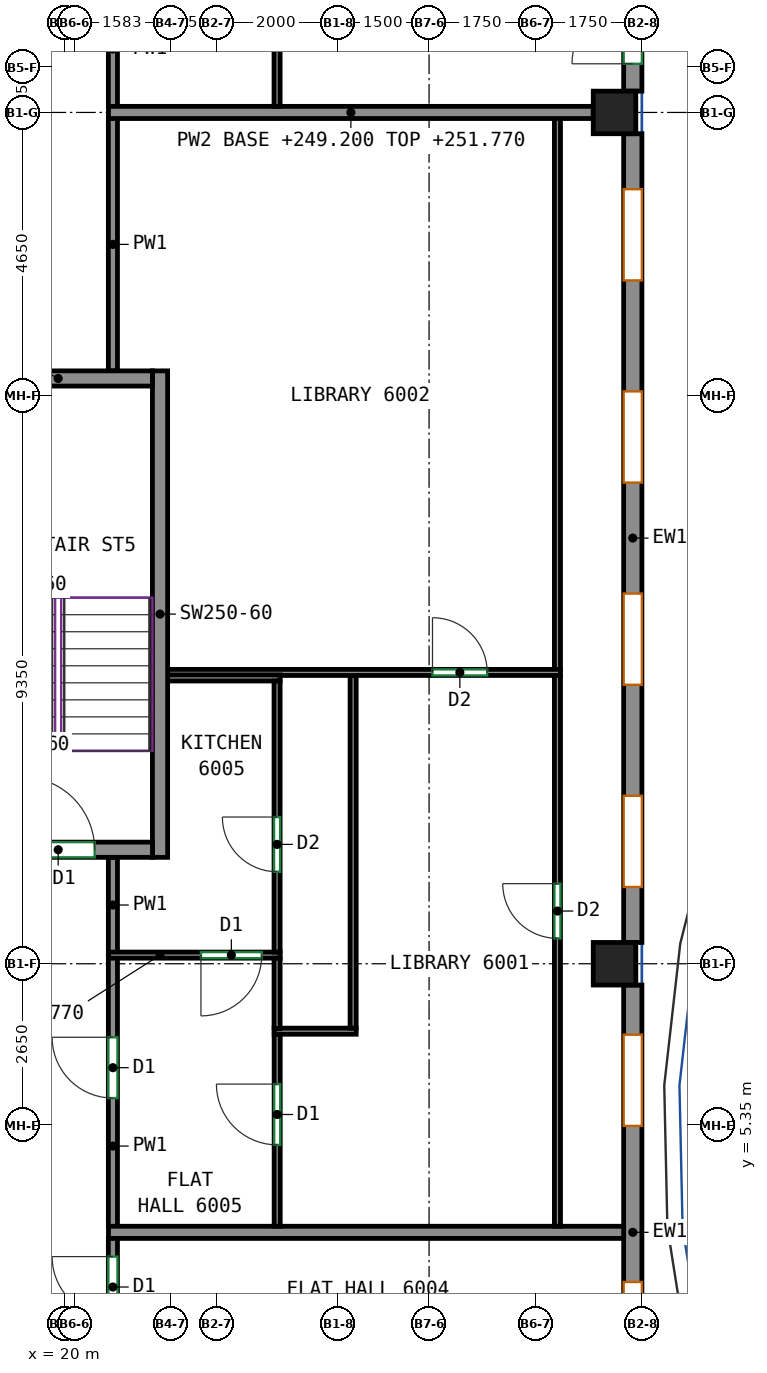
"""IFC4 building model, lengths in metres.
Left out: names, types, materials, properties, quantities, classifications, styles, units other than length and angle.
Written with IfcOpenShell. Run it as: python <this file> out.ifc"""

import sys

from ifc_helpers import new_model, si_unit, direction, frame, frame_2d, origin, origin_2d, place, context, subcontext, project, spatial, rectangle, extrude, source, transform, mapped, element, fill, save


model = new_model("IFC4")
c1 = context("Model", 3, precision=1e-05, world=origin(), true_north=direction((0.0, 1.0)))
c2 = subcontext(c1, "Body", "Model", "MODEL_VIEW")
j1 = project(units=[si_unit("LENGTHUNIT", "METRE"), si_unit("PLANEANGLEUNIT", "RADIAN")], contexts=[c1])
p1 = place(None, origin())
s1 = spatial("IfcSite", under=j1, at=p1, CompositionType="ELEMENT")
p2 = place(p1, origin())
s2 = spatial("IfcBuilding", under=s1, at=p2, CompositionType="ELEMENT")
p3 = place(p2, frame((0.0, 0.0, 249.2)))
s3 = spatial("IfcBuildingStorey", under=s2, at=p3, CompositionType="ELEMENT", Elevation=249.2)
m1 = source(origin(), c2, "Body", "SweptSolid", [
    extrude(rectangle(XDim=0.7, YDim=0.7, at=origin_2d()), origin(), (0.0, 0.0, 1.0), 3.12),
])
for number, where, z_axis, x_axis in (
    (1, (29.05, 8.0, 0.0), (0.0, 0.0, 1.0), (1.0, 0.0, 0.0)),
    (2, (29.05, 22.0, 0.0), (0.0, 0.0, 1.0), (1.0, 0.0, 0.0)),
):
    element("IfcColumn", number, at=place(p3, frame(where, z_axis=z_axis, x_axis=x_axis)), inside=s3, PredefinedType="COLUMN", context=c2, shape_type="MappedRepresentation", body=[
        mapped(m1, transform((0.0, 0.0, 0.0))),
    ])
m2 = source(origin(), c2, "Body", "SweptSolid", [
    extrude(rectangle(XDim=8.0, YDim=0.25, at=frame_2d((4.0, 0.0))), origin(), (0.0, 0.0, 1.0), 3.12),
])
p4 = place(p3, frame((21.575, 9.75, 0.0), z_axis=(0.0, 0.0, 1.0), x_axis=(0.0, 1.0, 0.0)))
e3 = element("IfcWall", 3, at=p4, inside=s3, PredefinedType="SHEAR", context=c2, shape_type="MappedRepresentation", body=[
    mapped(m2, transform((0.0, 0.0, 0.0))),
])
m3 = source(origin(), c2, "Body", "SweptSolid", [
    extrude(rectangle(XDim=3.1, YDim=0.25, at=frame_2d((1.55, 0.0))), origin(), (0.0, 0.0, 1.0), 3.12),
])
p5 = place(p3, frame((18.35, 9.875, 0.0), z_axis=(0.0, 0.0, 1.0), x_axis=(1.0, 0.0, 0.0)))
e4 = element("IfcWall", 4, at=p5, inside=s3, PredefinedType="SHEAR", context=c2, shape_type="MappedRepresentation", body=[
    mapped(m3, transform((0.0, 0.0, 0.0))),
])
p6 = place(p5, frame((0.95, 0.0, 0.0)))
e5 = element("IfcOpeningElement", 5, at=p6, cuts=e4, PredefinedType="OPENING", context=c2, shape_type="SweptSolid", body=[
    extrude(rectangle(XDim=1.2, YDim=2.1, at=frame_2d((0.6, 1.05))), frame((0.0, 0.135, 0.0), z_axis=(0.0, -1.0, 0.0), x_axis=(1.0, 0.0, 0.0)), (0.0, 0.0, 1.0), 0.27),
])
p7 = place(p3, frame((18.35, 17.625, 0.0), z_axis=(0.0, 0.0, 1.0), x_axis=(1.0, 0.0, 0.0)))
e6 = element("IfcWall", 6, at=p7, inside=s3, PredefinedType="SHEAR", context=c2, shape_type="MappedRepresentation", body=[
    mapped(m3, transform((0.0, 0.0, 0.0))),
])
m4 = source(origin(), c2, "Body", "SweptSolid", [
    extrude(rectangle(XDim=8.133, YDim=0.3, at=frame_2d((4.067, 0.0))), origin(), (0.0, 0.0, 1.0), 3.12),
])
p8 = place(p3, frame((29.35, -0.483, 0.0), z_axis=(0.0, 0.0, 1.0), x_axis=(0.0, 1.0, 0.0)))
e7 = element("IfcWall", 7, at=p8, inside=s3, PredefinedType="SOLIDWALL", context=c2, shape_type="MappedRepresentation", body=[
    mapped(m4, transform((0.0, 0.0, 0.0))),
])
p9 = place(p8, frame((1.75, 0.0, 0.8)))
e8 = element("IfcOpeningElement", 8, at=p9, cuts=e7, PredefinedType="OPENING", context=c2, shape_type="SweptSolid", body=[
    extrude(rectangle(XDim=1.5, YDim=2.05, at=frame_2d((0.75, 1.025))), frame((0.0, 0.16, 0.0), z_axis=(0.0, -1.0, 0.0), x_axis=(1.0, 0.0, 0.0)), (0.0, 0.0, 1.0), 0.32),
])
p10 = place(p8, frame((5.817, 0.0, 0.8)))
e9 = element("IfcOpeningElement", 9, at=p10, cuts=e7, PredefinedType="OPENING", context=c2, shape_type="SweptSolid", body=[
    extrude(rectangle(XDim=1.5, YDim=2.05, at=frame_2d((0.75, 1.025))), frame((0.0, 0.16, 0.0), z_axis=(0.0, -1.0, 0.0), x_axis=(1.0, 0.0, 0.0)), (0.0, 0.0, 1.0), 0.32),
])
m5 = source(origin(), c2, "Body", "SweptSolid", [
    extrude(rectangle(XDim=13.3, YDim=0.3, at=frame_2d((6.65, 0.0))), origin(), (0.0, 0.0, 1.0), 3.12),
])
p11 = place(p3, frame((29.35, 8.35, 0.0), z_axis=(0.0, 0.0, 1.0), x_axis=(0.0, 1.0, 0.0)))
e10 = element("IfcWall", 10, at=p11, inside=s3, PredefinedType="SOLIDWALL", context=c2, shape_type="MappedRepresentation", body=[
    mapped(m5, transform((0.0, 0.0, 0.0))),
])
p12 = place(p11, frame((0.913, 0.0, 0.8)))
e11 = element("IfcOpeningElement", 11, at=p12, cuts=e10, PredefinedType="OPENING", context=c2, shape_type="SweptSolid", body=[
    extrude(rectangle(XDim=1.5, YDim=2.05, at=frame_2d((0.75, 1.025))), frame((0.0, 0.16, 0.0), z_axis=(0.0, -1.0, 0.0), x_axis=(1.0, 0.0, 0.0)), (0.0, 0.0, 1.0), 0.32),
])
p13 = place(p11, frame((4.238, 0.0, 0.8)))
e12 = element("IfcOpeningElement", 12, at=p13, cuts=e10, PredefinedType="OPENING", context=c2, shape_type="SweptSolid", body=[
    extrude(rectangle(XDim=1.5, YDim=2.05, at=frame_2d((0.75, 1.025))), frame((0.0, 0.16, 0.0), z_axis=(0.0, -1.0, 0.0), x_axis=(1.0, 0.0, 0.0)), (0.0, 0.0, 1.0), 0.32),
])
p14 = place(p11, frame((7.562, 0.0, 0.8)))
e13 = element("IfcOpeningElement", 13, at=p14, cuts=e10, PredefinedType="OPENING", context=c2, shape_type="SweptSolid", body=[
    extrude(rectangle(XDim=1.5, YDim=2.05, at=frame_2d((0.75, 1.025))), frame((0.0, 0.16, 0.0), z_axis=(0.0, -1.0, 0.0), x_axis=(1.0, 0.0, 0.0)), (0.0, 0.0, 1.0), 0.32),
])
p15 = place(p11, frame((10.887, 0.0, 0.8)))
e14 = element("IfcOpeningElement", 14, at=p15, cuts=e10, PredefinedType="OPENING", context=c2, shape_type="SweptSolid", body=[
    extrude(rectangle(XDim=1.5, YDim=2.05, at=frame_2d((0.75, 1.025))), frame((0.0, 0.16, 0.0), z_axis=(0.0, -1.0, 0.0), x_axis=(1.0, 0.0, 0.0)), (0.0, 0.0, 1.0), 0.32),
])
m6 = source(origin(), c2, "Body", "SweptSolid", [
    extrude(rectangle(XDim=4.3, YDim=0.3, at=frame_2d((2.15, 0.0))), origin(), (0.0, 0.0, 1.0), 3.12),
])
p16 = place(p3, frame((29.35, 22.35, 0.0), z_axis=(0.0, 0.0, 1.0), x_axis=(0.0, 1.0, 0.0)))
e15 = element("IfcWall", 15, at=p16, inside=s3, PredefinedType="SOLIDWALL", context=c2, shape_type="MappedRepresentation", body=[
    mapped(m6, transform((0.0, 0.0, 0.0))),
])
p17 = place(p16, frame((1.75, 0.0, 0.8)))
e16 = element("IfcOpeningElement", 16, at=p17, cuts=e15, PredefinedType="OPENING", context=c2, shape_type="SweptSolid", body=[
    extrude(rectangle(XDim=1.5, YDim=2.05, at=frame_2d((0.75, 1.025))), frame((0.0, 0.16, 0.0), z_axis=(0.0, -1.0, 0.0), x_axis=(1.0, 0.0, 0.0)), (0.0, 0.0, 1.0), 0.32),
])
p18 = place(p16, frame((0.45, 0.0, 0.0)))
e17 = element("IfcOpeningElement", 17, at=p18, cuts=e15, PredefinedType="OPENING", context=c2, shape_type="SweptSolid", body=[
    extrude(rectangle(XDim=1.0, YDim=2.1, at=frame_2d((0.5, 1.05))), frame((0.0, 0.16, 0.0), z_axis=(0.0, -1.0, 0.0), x_axis=(1.0, 0.0, 0.0)), (0.0, 0.0, 1.0), 0.32),
])
p19 = place(p3, frame((20.8, 1.007, 0.0), z_axis=(0.0, 0.0, 1.0), x_axis=(0.0, 1.0, 0.0)))
e18 = element("IfcWall", 18, at=p19, inside=s3, PredefinedType="PARTITIONING", context=c2, shape_type="SweptSolid", body=[
    extrude(rectangle(XDim=2.486, YDim=0.15, at=frame_2d((1.243, 0.0))), origin(), (0.0, 0.0, 1.0), 3.12),
])
p20 = place(p19, frame((1.177, 0.0, 0.0)))
e19 = element("IfcOpeningElement", 19, at=p20, cuts=e18, PredefinedType="OPENING", context=c2, shape_type="SweptSolid", body=[
    extrude(rectangle(XDim=1.0, YDim=2.1, at=frame_2d((0.5, 1.05))), frame((0.0, 0.085, 0.0), z_axis=(0.0, -1.0, 0.0), x_axis=(1.0, 0.0, 0.0)), (0.0, 0.0, 1.0), 0.17),
])
p21 = place(p3, frame((20.8, 17.75, 0.0), z_axis=(0.0, 0.0, 1.0), x_axis=(0.0, 1.0, 0.0)))
e20 = element("IfcWall", 20, at=p21, inside=s3, PredefinedType="PARTITIONING", context=c2, shape_type="SweptSolid", body=[
    extrude(rectangle(XDim=4.16, YDim=0.15, at=frame_2d((2.08, 0.0))), origin(), (0.0, 0.0, 1.0), 3.12),
])
p22 = place(p3, frame((20.8, 3.673, 0.0), z_axis=(0.0, 0.0, 1.0), x_axis=(0.0, 1.0, 0.0)))
e21 = element("IfcWall", 21, at=p22, inside=s3, PredefinedType="PARTITIONING", context=c2, shape_type="SweptSolid", body=[
    extrude(rectangle(XDim=4.429, YDim=0.15, at=frame_2d((2.214, 0.0))), origin(), (0.0, 0.0, 1.0), 3.12),
])
p23 = place(p22, frame((2.118, 0.0, 0.0)))
e22 = element("IfcOpeningElement", 22, at=p23, cuts=e21, PredefinedType="OPENING", context=c2, shape_type="SweptSolid", body=[
    extrude(rectangle(XDim=1.0, YDim=2.1, at=frame_2d((0.5, 1.05))), frame((0.0, 0.085, 0.0), z_axis=(0.0, -1.0, 0.0), x_axis=(1.0, 0.0, 0.0)), (0.0, 0.0, 1.0), 0.17),
])
p24 = place(p3, frame((20.8, 8.182, 0.0), z_axis=(0.0, 0.0, 1.0), x_axis=(0.0, 1.0, 0.0)))
e23 = element("IfcWall", 23, at=p24, inside=s3, PredefinedType="PARTITIONING", context=c2, shape_type="SweptSolid", body=[
    extrude(rectangle(XDim=1.568, YDim=0.15, at=frame_2d((0.784, 0.0))), origin(), (0.0, 0.0, 1.0), 3.12),
])
p25 = place(p3, frame((20.8, 22.09, 0.0), z_axis=(0.0, 0.0, 1.0), x_axis=(0.0, 1.0, 0.0)))
e24 = element("IfcWall", 24, at=p25, inside=s3, PredefinedType="PARTITIONING", context=c2, shape_type="SweptSolid", body=[
    extrude(rectangle(XDim=1.908, YDim=0.15, at=frame_2d((0.954, 0.0))), origin(), (0.0, 0.0, 1.0), 3.12),
])
p26 = place(p3, frame((20.727, 3.583, 0.0), z_axis=(0.0, 0.0, 1.0), x_axis=(1.0, 0.0, 0.0)))
e25 = element("IfcWall", 25, at=p26, inside=s3, PredefinedType="PARTITIONING", context=c2, shape_type="SweptSolid", body=[
    extrude(rectangle(XDim=8.523, YDim=0.2, at=frame_2d((4.261, 0.0))), origin(), (0.0, 0.0, 1.0), 3.12),
])
p27 = place(p3, frame((23.502, 3.683, 0.0), z_axis=(0.0, 0.0, 1.0), x_axis=(0.0, 1.0, 0.0)))
e26 = element("IfcWall", 26, at=p27, inside=s3, PredefinedType="PARTITIONING", context=c2, shape_type="SweptSolid", body=[
    extrude(rectangle(XDim=3.158, YDim=0.1, at=frame_2d((1.579, 0.0))), origin(), (0.0, 0.0, 1.0), 3.12),
])
p28 = place(p27, frame((1.338, 0.0, 0.0)))
e27 = element("IfcOpeningElement", 27, at=p28, cuts=e26, PredefinedType="OPENING", context=c2, shape_type="SweptSolid", body=[
    extrude(rectangle(XDim=1.0, YDim=2.1, at=frame_2d((0.5, 1.05))), frame((0.0, 0.06, 0.0), z_axis=(0.0, -1.0, 0.0), x_axis=(1.0, 0.0, 0.0)), (0.0, 0.0, 1.0), 0.12),
])
p29 = place(p3, frame((28.111, 3.683, 0.0), z_axis=(0.0, 0.0, 1.0), x_axis=(0.0, 1.0, 0.0)))
e28 = element("IfcWall", 28, at=p29, inside=s3, PredefinedType="PARTITIONING", context=c2, shape_type="SweptSolid", body=[
    extrude(rectangle(XDim=9.058, YDim=0.1, at=frame_2d((4.529, 0.0))), origin(), (0.0, 0.0, 1.0), 3.12),
])
p30 = place(p29, frame((4.734, 0.0, 0.0)))
e29 = element("IfcOpeningElement", 29, at=p30, cuts=e28, PredefinedType="OPENING", context=c2, shape_type="SweptSolid", body=[
    extrude(rectangle(XDim=0.9, YDim=2.1, at=frame_2d((0.45, 1.05))), frame((0.0, 0.06, 0.0), z_axis=(0.0, -1.0, 0.0), x_axis=(1.0, 0.0, 0.0)), (0.0, 0.0, 1.0), 0.12),
])
p31 = place(p3, frame((24.801, 6.891, 0.0), z_axis=(0.0, 0.0, 1.0), x_axis=(-1.0, 0.0, 0.0)))
e30 = element("IfcWall", 30, at=p31, inside=s3, PredefinedType="PARTITIONING", context=c2, shape_type="SweptSolid", body=[
    extrude(rectangle(XDim=1.349, YDim=0.1, at=frame_2d((0.675, 0.0))), origin(), (0.0, 0.0, 1.0), 3.12),
])
p32 = place(p3, frame((24.751, 12.741, 0.0), z_axis=(0.0, 0.0, 1.0), x_axis=(0.0, -1.0, 0.0)))
e31 = element("IfcWall", 31, at=p32, inside=s3, PredefinedType="PARTITIONING", context=c2, shape_type="SweptSolid", body=[
    extrude(rectangle(XDim=5.8, YDim=0.1, at=frame_2d((2.9, 0.0))), origin(), (0.0, 0.0, 1.0), 3.12),
])
p33 = place(p3, frame((28.111, 12.841, 0.0), z_axis=(0.0, 0.0, 1.0), x_axis=(0.0, 1.0, 0.0)))
e32 = element("IfcWall", 32, at=p33, inside=s3, PredefinedType="PARTITIONING", context=c2, shape_type="SweptSolid", body=[
    extrude(rectangle(XDim=9.059, YDim=0.1, at=frame_2d((4.529, 0.0))), origin(), (0.0, 0.0, 1.0), 3.12),
])
p34 = place(p3, frame((20.727, 22.0, 0.0), z_axis=(0.0, 0.0, 1.0), x_axis=(1.0, 0.0, 0.0)))
e33 = element("IfcWall", 33, at=p34, inside=s3, PredefinedType="PARTITIONING", context=c2, shape_type="SweptSolid", body=[
    extrude(rectangle(XDim=7.973, YDim=0.2, at=frame_2d((3.986, 0.0))), origin(), (0.0, 0.0, 1.0), 2.57),
])
p35 = place(p3, frame((21.7, 12.791, 0.0), z_axis=(0.0, 0.0, 1.0), x_axis=(1.0, 0.0, 0.0)))
e34 = element("IfcWall", 34, at=p35, inside=s3, PredefinedType="PARTITIONING", context=c2, shape_type="SweptSolid", body=[
    extrude(rectangle(XDim=6.461, YDim=0.1, at=frame_2d((3.23, 0.0))), origin(), (0.0, 0.0, 1.0), 3.12),
])
p36 = place(p35, frame((4.356, 0.0, 0.0)))
e35 = element("IfcOpeningElement", 35, at=p36, cuts=e34, PredefinedType="OPENING", context=c2, shape_type="SweptSolid", body=[
    extrude(rectangle(XDim=0.9, YDim=2.1, at=frame_2d((0.45, 1.05))), frame((0.0, 0.06, 0.0), z_axis=(0.0, -1.0, 0.0), x_axis=(1.0, 0.0, 0.0)), (0.0, 0.0, 1.0), 0.12),
])
p37 = place(p3, frame((23.55, 8.142, 0.0), z_axis=(0.0, 0.0, 1.0), x_axis=(-1.0, 0.0, 0.0)))
e36 = element("IfcWall", 36, at=p37, inside=s3, PredefinedType="PARTITIONING", context=c2, shape_type="SweptSolid", body=[
    extrude(rectangle(XDim=2.823, YDim=0.1, at=frame_2d((1.412, 0.0))), origin(), (0.0, 0.0, 1.0), 2.57),
])
p38 = place(p37, frame((0.302, 0.0, 0.0)))
e37 = element("IfcOpeningElement", 37, at=p38, cuts=e36, PredefinedType="OPENING", context=c2, shape_type="SweptSolid", body=[
    extrude(rectangle(XDim=1.0, YDim=2.1, at=frame_2d((0.5, 1.05))), frame((0.0, 0.06, 0.0), z_axis=(0.0, -1.0, 0.0), x_axis=(1.0, 0.0, 0.0)), (0.0, 0.0, 1.0), 0.12),
])
p39 = place(p3, frame((23.5, 6.932, 0.0), z_axis=(0.0, 0.0, 1.0), x_axis=(0.0, 1.0, 0.0)))
e38 = element("IfcWall", 38, at=p39, inside=s3, PredefinedType="PARTITIONING", context=c2, shape_type="SweptSolid", body=[
    extrude(rectangle(XDim=1.16, YDim=0.1, at=frame_2d((0.58, 0.0))), origin(), (0.0, 0.0, 1.0), 3.12),
])
p40 = place(p3, frame((23.55, 12.7, 0.0), z_axis=(0.0, 0.0, 1.0), x_axis=(-1.0, 0.0, 0.0)))
e39 = element("IfcWall", 39, at=p40, inside=s3, PredefinedType="PARTITIONING", context=c2, shape_type="SweptSolid", body=[
    extrude(rectangle(XDim=1.85, YDim=0.1, at=frame_2d((0.925, 0.0))), origin(), (0.0, 0.0, 1.0), 3.12),
])
p41 = place(p3, frame((23.5, 8.192, 0.0), z_axis=(0.0, 0.0, 1.0), x_axis=(0.0, 1.0, 0.0)))
e40 = element("IfcWall", 40, at=p41, inside=s3, PredefinedType="PARTITIONING", context=c2, shape_type="SweptSolid", body=[
    extrude(rectangle(XDim=4.458, YDim=0.1, at=frame_2d((2.229, 0.0))), origin(), (0.0, 0.0, 1.0), 3.12),
])
p42 = place(p41, frame((1.321, 0.0, 0.0)))
e41 = element("IfcOpeningElement", 41, at=p42, cuts=e40, PredefinedType="OPENING", context=c2, shape_type="SweptSolid", body=[
    extrude(rectangle(XDim=0.9, YDim=2.1, at=frame_2d((0.45, 1.05))), frame((0.0, 0.06, 0.0), z_axis=(0.0, -1.0, 0.0), x_axis=(1.0, 0.0, 0.0)), (0.0, 0.0, 1.0), 0.12),
])
p43 = place(p3, frame((23.5, 22.1, 0.0), z_axis=(0.0, 0.0, 1.0), x_axis=(0.0, 1.0, 0.0)))
e42 = element("IfcWall", 42, at=p43, inside=s3, PredefinedType="PARTITIONING", context=c2, shape_type="SweptSolid", body=[
    extrude(rectangle(XDim=4.598, YDim=0.1, at=frame_2d((2.299, 0.0))), origin(), (0.0, 0.0, 1.0), 3.12),
])
p44 = place(p9, origin())
e43 = element("IfcWindow", 43, at=p44, inside=s3, PartitioningType="SINGLE_PANEL", PredefinedType="WINDOW", context=c2, shape_type="SweptSolid", body=[
    extrude(rectangle(XDim=1.5, YDim=2.05, at=frame_2d((0.75, 1.025))), frame((0.0, 0.03, 0.0), z_axis=(0.0, -1.0, 0.0), x_axis=(1.0, 0.0, 0.0)), (0.0, 0.0, 1.0), 0.06),
])
fill(e8, e43)
p45 = place(p10, origin())
e44 = element("IfcWindow", 44, at=p45, inside=s3, PartitioningType="SINGLE_PANEL", PredefinedType="WINDOW", context=c2, shape_type="SweptSolid", body=[
    extrude(rectangle(XDim=1.5, YDim=2.05, at=frame_2d((0.75, 1.025))), frame((0.0, 0.03, 0.0), z_axis=(0.0, -1.0, 0.0), x_axis=(1.0, 0.0, 0.0)), (0.0, 0.0, 1.0), 0.06),
])
fill(e9, e44)
p46 = place(p12, origin())
e45 = element("IfcWindow", 45, at=p46, inside=s3, PartitioningType="SINGLE_PANEL", PredefinedType="WINDOW", context=c2, shape_type="SweptSolid", body=[
    extrude(rectangle(XDim=1.5, YDim=2.05, at=frame_2d((0.75, 1.025))), frame((0.0, 0.03, 0.0), z_axis=(0.0, -1.0, 0.0), x_axis=(1.0, 0.0, 0.0)), (0.0, 0.0, 1.0), 0.06),
])
fill(e11, e45)
p47 = place(p13, origin())
e46 = element("IfcWindow", 46, at=p47, inside=s3, PartitioningType="SINGLE_PANEL", PredefinedType="WINDOW", context=c2, shape_type="SweptSolid", body=[
    extrude(rectangle(XDim=1.5, YDim=2.05, at=frame_2d((0.75, 1.025))), frame((0.0, 0.03, 0.0), z_axis=(0.0, -1.0, 0.0), x_axis=(1.0, 0.0, 0.0)), (0.0, 0.0, 1.0), 0.06),
])
fill(e12, e46)
p48 = place(p14, origin())
e47 = element("IfcWindow", 47, at=p48, inside=s3, PartitioningType="SINGLE_PANEL", PredefinedType="WINDOW", context=c2, shape_type="SweptSolid", body=[
    extrude(rectangle(XDim=1.5, YDim=2.05, at=frame_2d((0.75, 1.025))), frame((0.0, 0.03, 0.0), z_axis=(0.0, -1.0, 0.0), x_axis=(1.0, 0.0, 0.0)), (0.0, 0.0, 1.0), 0.06),
])
fill(e13, e47)
p49 = place(p15, origin())
e48 = element("IfcWindow", 48, at=p49, inside=s3, PartitioningType="SINGLE_PANEL", PredefinedType="WINDOW", context=c2, shape_type="SweptSolid", body=[
    extrude(rectangle(XDim=1.5, YDim=2.05, at=frame_2d((0.75, 1.025))), frame((0.0, 0.03, 0.0), z_axis=(0.0, -1.0, 0.0), x_axis=(1.0, 0.0, 0.0)), (0.0, 0.0, 1.0), 0.06),
])
fill(e14, e48)
p50 = place(p18, origin())
e49 = element("IfcDoor", 49, at=p50, inside=s3, OperationType="SINGLE_SWING_LEFT", PredefinedType="DOOR", context=c2, shape_type="SweptSolid", body=[
    extrude(rectangle(XDim=1.0, YDim=2.1, at=frame_2d((0.5, 1.05))), frame((0.0, 0.025, 0.0), z_axis=(0.0, -1.0, 0.0), x_axis=(1.0, 0.0, 0.0)), (0.0, 0.0, 1.0), 0.05),
])
fill(e17, e49)
p51 = place(p6, origin())
e50 = element("IfcDoor", 50, at=p51, inside=s3, OperationType="DOUBLE_DOOR_SINGLE_SWING", PredefinedType="DOOR", context=c2, shape_type="SweptSolid", body=[
    extrude(rectangle(XDim=1.2, YDim=2.1, at=frame_2d((0.6, 1.05))), frame((0.0, 0.025, 0.0), z_axis=(0.0, -1.0, 0.0), x_axis=(1.0, 0.0, 0.0)), (0.0, 0.0, 1.0), 0.05),
])
fill(e5, e50)
p52 = place(p20, origin())
e51 = element("IfcDoor", 51, at=p52, inside=s3, OperationType="SINGLE_SWING_RIGHT", PredefinedType="DOOR", context=c2, shape_type="SweptSolid", body=[
    extrude(rectangle(XDim=1.0, YDim=2.1, at=frame_2d((0.5, 1.05))), frame((0.0, 0.025, 0.0), z_axis=(0.0, -1.0, 0.0), x_axis=(1.0, 0.0, 0.0)), (0.0, 0.0, 1.0), 0.05),
])
fill(e19, e51)
p53 = place(p28, origin())
e52 = element("IfcDoor", 52, at=p53, inside=s3, OperationType="SINGLE_SWING_RIGHT", PredefinedType="DOOR", context=c2, shape_type="SweptSolid", body=[
    extrude(rectangle(XDim=1.0, YDim=2.1, at=frame_2d((0.5, 1.05))), frame((0.0, 0.025, 0.0), z_axis=(0.0, -1.0, 0.0), x_axis=(1.0, 0.0, 0.0)), (0.0, 0.0, 1.0), 0.05),
])
fill(e27, e52)
p54 = place(p23, origin())
e53 = element("IfcDoor", 53, at=p54, inside=s3, OperationType="SINGLE_SWING_RIGHT", PredefinedType="DOOR", context=c2, shape_type="SweptSolid", body=[
    extrude(rectangle(XDim=1.0, YDim=2.1, at=frame_2d((0.5, 1.05))), frame((0.0, 0.025, 0.0), z_axis=(0.0, -1.0, 0.0), x_axis=(1.0, 0.0, 0.0)), (0.0, 0.0, 1.0), 0.05),
])
fill(e22, e53)
p55 = place(p38, origin())
e54 = element("IfcDoor", 54, at=p55, inside=s3, OperationType="SINGLE_SWING_RIGHT", PredefinedType="DOOR", context=c2, shape_type="SweptSolid", body=[
    extrude(rectangle(XDim=1.0, YDim=2.1, at=frame_2d((0.5, 1.05))), frame((0.0, 0.025, 0.0), z_axis=(0.0, -1.0, 0.0), x_axis=(1.0, 0.0, 0.0)), (0.0, 0.0, 1.0), 0.05),
])
fill(e37, e54)
p56 = place(p30, origin())
e55 = element("IfcDoor", 55, at=p56, inside=s3, OperationType="SINGLE_SWING_RIGHT", PredefinedType="DOOR", context=c2, shape_type="SweptSolid", body=[
    extrude(rectangle(XDim=0.9, YDim=2.1, at=frame_2d((0.45, 1.05))), frame((0.0, 0.025, 0.0), z_axis=(0.0, -1.0, 0.0), x_axis=(1.0, 0.0, 0.0)), (0.0, 0.0, 1.0), 0.05),
])
fill(e29, e55)
p57 = place(p42, origin())
e56 = element("IfcDoor", 56, at=p57, inside=s3, OperationType="SINGLE_SWING_RIGHT", PredefinedType="DOOR", context=c2, shape_type="SweptSolid", body=[
    extrude(rectangle(XDim=0.9, YDim=2.1, at=frame_2d((0.45, 1.05))), frame((0.0, 0.025, 0.0), z_axis=(0.0, -1.0, 0.0), x_axis=(1.0, 0.0, 0.0)), (0.0, 0.0, 1.0), 0.05),
])
fill(e41, e56)
p58 = place(p36, origin())
e57 = element("IfcDoor", 57, at=p58, inside=s3, OperationType="SINGLE_SWING_LEFT", PredefinedType="DOOR", context=c2, shape_type="SweptSolid", body=[
    extrude(rectangle(XDim=0.9, YDim=2.1, at=frame_2d((0.45, 1.05))), frame((0.0, 0.025, 0.0), z_axis=(0.0, -1.0, 0.0), x_axis=(1.0, 0.0, 0.0)), (0.0, 0.0, 1.0), 0.05),
])
fill(e35, e57)
save(model, sys.argv[1])
